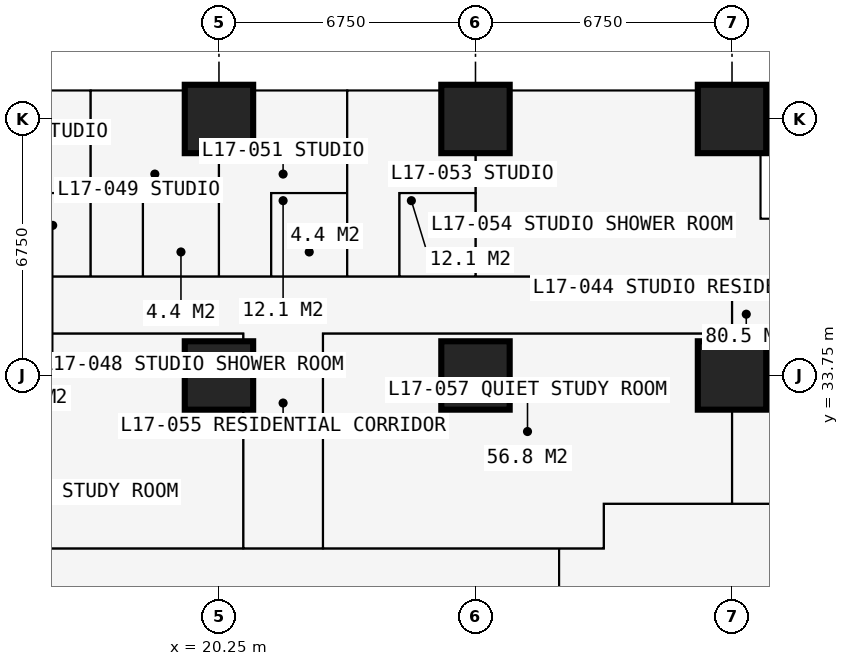
"""IFC4 building model, lengths in metres.
Left out: names, types, materials, properties, quantities, classifications, styles, units other than length and angle.
Written with IfcOpenShell. Run it as: python <this file> out.ifc"""

import sys

from ifc_helpers import new_model, si_unit, direction, frame, frame_2d, origin, origin_2d, place, context, subcontext, project, spatial, rectangle, extrude, element, fill, save


model = new_model("IFC4")
c1 = context("Model", 3, precision=1e-05, world=origin(), true_north=direction((0.0, 1.0)))
c2 = subcontext(c1, "Body", "Model", "MODEL_VIEW")
j1 = project(units=[si_unit("LENGTHUNIT", "METRE"), si_unit("PLANEANGLEUNIT", "RADIAN")], contexts=[c1])
p1 = place(None, origin())
s1 = spatial("IfcSite", under=j1, at=p1, CompositionType="ELEMENT")
p2 = place(p1, origin())
s2 = spatial("IfcBuilding", under=s1, at=p2, CompositionType="ELEMENT")
p3 = place(p2, frame((0.0, 0.0, 64.8)))
s3 = spatial("IfcBuildingStorey", under=s2, at=p3, CompositionType="ELEMENT", Elevation=64.8)
for number, where, z_axis, x_axis in (
    (1, (20.25, 33.75, 0.0), (0.0, 0.0, 1.0), (1.0, 0.0, 0.0)),
    (2, (20.25, 40.5, 0.0), (0.0, 0.0, 1.0), (1.0, 0.0, 0.0)),
    (3, (27.0, 33.75, 0.0), (0.0, 0.0, 1.0), (1.0, 0.0, 0.0)),
    (4, (27.0, 40.5, 0.0), (0.0, 0.0, 1.0), (1.0, 0.0, 0.0)),
    (5, (33.75, 33.75, 0.0), (0.0, 0.0, 1.0), (1.0, 0.0, 0.0)),
    (6, (33.75, 40.5, 0.0), (0.0, 0.0, 1.0), (1.0, 0.0, 0.0)),
):
    element("IfcColumn", number, at=place(p3, frame(where, z_axis=z_axis, x_axis=x_axis)), inside=s3, PredefinedType="COLUMN", context=c2, shape_type="SweptSolid", body=[
        extrude(rectangle(XDim=1.8, YDim=1.8, at=origin_2d()), origin(), (0.0, 0.0, 1.0), 3.6),
    ])
p4 = place(p3, frame((37.875, 37.875, 0.0), z_axis=(0.0, 0.0, 1.0), x_axis=(-1.0, 0.0, 0.0)))
e7 = element("IfcWall", 7, at=p4, inside=s3, PredefinedType="SOLIDWALL", context=c2, shape_type="SweptSolid", body=[
    extrude(rectangle(XDim=3.375, YDim=0.3, at=frame_2d((1.688, 0.0))), origin(), (0.0, 0.0, 1.0), 3.375),
])
p5 = place(p4, frame((0.788, 0.0, 0.6)))
e8 = element("IfcOpeningElement", 8, at=p5, cuts=e7, PredefinedType="OPENING", context=c2, shape_type="SweptSolid", body=[
    extrude(rectangle(XDim=1.8, YDim=2.1, at=frame_2d((0.9, 1.05))), frame((0.0, 0.16, 0.0), z_axis=(0.0, -1.0, 0.0), x_axis=(1.0, 0.0, 0.0)), (0.0, 0.0, 1.0), 0.32),
])
p6 = place(p3, frame((34.5, 37.875, 0.0), z_axis=(0.0, 0.0, 1.0), x_axis=(0.0, 1.0, 0.0)))
e9 = element("IfcWall", 9, at=p6, inside=s3, PredefinedType="SOLIDWALL", context=c2, shape_type="SweptSolid", body=[
    extrude(rectangle(XDim=3.375, YDim=0.3, at=frame_2d((1.688, 0.0))), origin(), (0.0, 0.0, 1.0), 3.375),
])
p7 = place(p6, frame((0.343, 0.0, 0.9)))
e10 = element("IfcOpeningElement", 10, at=p7, cuts=e9, PredefinedType="OPENING", context=c2, shape_type="SweptSolid", body=[
    extrude(rectangle(XDim=1.2, YDim=1.8, at=frame_2d((0.6, 0.9))), frame((0.0, 0.16, 0.0), z_axis=(0.0, -1.0, 0.0), x_axis=(1.0, 0.0, 0.0)), (0.0, 0.0, 1.0), 0.32),
])
p8 = place(p3, frame((20.25, 41.25, 0.0), z_axis=(0.0, 0.0, 1.0), x_axis=(1.0, 0.0, 0.0)))
e11 = element("IfcWall", 11, at=p8, inside=s3, PredefinedType="SOLIDWALL", context=c2, shape_type="SweptSolid", body=[
    extrude(rectangle(XDim=6.75, YDim=0.15, at=frame_2d((3.375, 0.0))), origin(), (0.0, 0.0, 1.0), 3.375),
])
p9 = place(p8, frame((0.962, 0.0, 0.0)))
e12 = element("IfcOpeningElement", 12, at=p9, cuts=e11, PredefinedType="OPENING", context=c2, shape_type="SweptSolid", body=[
    extrude(rectangle(XDim=1.0, YDim=2.2, at=frame_2d((0.5, 1.1))), frame((0.0, 0.085, 0.0), z_axis=(0.0, -1.0, 0.0), x_axis=(1.0, 0.0, 0.0)), (0.0, 0.0, 1.0), 0.17),
])
p10 = place(p8, frame((2.025, 0.0, 0.9)))
e13 = element("IfcOpeningElement", 13, at=p10, cuts=e11, PredefinedType="OPENING", context=c2, shape_type="SweptSolid", body=[
    extrude(rectangle(XDim=1.2, YDim=1.8, at=frame_2d((0.6, 0.9))), frame((0.0, 0.085, 0.0), z_axis=(0.0, -1.0, 0.0), x_axis=(1.0, 0.0, 0.0)), (0.0, 0.0, 1.0), 0.17),
])
p11 = place(p8, frame((4.788, 0.0, 0.0)))
e14 = element("IfcOpeningElement", 14, at=p11, cuts=e11, PredefinedType="OPENING", context=c2, shape_type="SweptSolid", body=[
    extrude(rectangle(XDim=1.0, YDim=2.2, at=frame_2d((0.5, 1.1))), frame((0.0, 0.085, 0.0), z_axis=(0.0, -1.0, 0.0), x_axis=(1.0, 0.0, 0.0)), (0.0, 0.0, 1.0), 0.17),
])
p12 = place(p8, frame((3.525, 0.0, 0.9)))
e15 = element("IfcOpeningElement", 15, at=p12, cuts=e11, PredefinedType="OPENING", context=c2, shape_type="SweptSolid", body=[
    extrude(rectangle(XDim=1.2, YDim=1.8, at=frame_2d((0.6, 0.9))), frame((0.0, 0.085, 0.0), z_axis=(0.0, -1.0, 0.0), x_axis=(1.0, 0.0, 0.0)), (0.0, 0.0, 1.0), 0.17),
])
p13 = place(p3, frame((23.625, 41.35, 0.0), z_axis=(0.0, 0.0, 1.0), x_axis=(0.0, 1.0, 0.0)))
e16 = element("IfcWall", 16, at=p13, inside=s3, PredefinedType="USERDEFINED", context=c2, shape_type="SweptSolid", body=[
    extrude(rectangle(XDim=2.2, YDim=1.0, at=frame_2d((1.1, 0.0))), origin(), (0.0, 0.0, 1.0), 0.9),
])
p14 = place(p3, frame((10.125, 34.85, 0.0), z_axis=(0.0, 0.0, 1.0), x_axis=(1.0, 0.0, 0.0)))
e17 = element("IfcWall", 17, at=p14, inside=s3, PredefinedType="PARTITIONING", context=c2, shape_type="SweptSolid", body=[
    extrude(rectangle(XDim=10.762, YDim=0.15, at=frame_2d((5.381, 0.0))), origin(), (0.0, 0.0, 1.0), 3.375),
])
p15 = place(p14, frame((4.9, 0.0, 0.0)))
e18 = element("IfcOpeningElement", 18, at=p15, cuts=e17, PredefinedType="OPENING", context=c2, shape_type="SweptSolid", body=[
    extrude(rectangle(XDim=0.95, YDim=2.2, at=frame_2d((0.475, 1.1))), frame((0.0, 0.085, 0.0), z_axis=(0.0, -1.0, 0.0), x_axis=(1.0, 0.0, 0.0)), (0.0, 0.0, 1.0), 0.17),
])
p16 = place(p3, frame((10.125, 36.35, 0.0), z_axis=(0.0, 0.0, 1.0), x_axis=(1.0, 0.0, 0.0)))
e19 = element("IfcWall", 19, at=p16, inside=s3, PredefinedType="PARTITIONING", context=c2, shape_type="SweptSolid", body=[
    extrude(rectangle(XDim=23.625, YDim=0.1, at=frame_2d((11.812, 0.0))), origin(), (0.0, 0.0, 1.0), 3.375),
])
p17 = place(p16, frame((0.2, 0.0, 0.0)))
e20 = element("IfcOpeningElement", 20, at=p17, cuts=e19, PredefinedType="OPENING", context=c2, shape_type="SweptSolid", body=[
    extrude(rectangle(XDim=0.95, YDim=2.2, at=frame_2d((0.475, 1.1))), frame((0.0, 0.06, 0.0), z_axis=(0.0, -1.0, 0.0), x_axis=(1.0, 0.0, 0.0)), (0.0, 0.0, 1.0), 0.12),
])
p18 = place(p16, frame((3.625, 0.0, 0.0)))
e21 = element("IfcOpeningElement", 21, at=p18, cuts=e19, PredefinedType="OPENING", context=c2, shape_type="SweptSolid", body=[
    extrude(rectangle(XDim=0.95, YDim=2.2, at=frame_2d((0.475, 1.1))), frame((0.0, 0.06, 0.0), z_axis=(0.0, -1.0, 0.0), x_axis=(1.0, 0.0, 0.0)), (0.0, 0.0, 1.0), 0.12),
])
p19 = place(p16, frame((7.0, 0.0, 0.0)))
e22 = element("IfcOpeningElement", 22, at=p19, cuts=e19, PredefinedType="OPENING", context=c2, shape_type="SweptSolid", body=[
    extrude(rectangle(XDim=0.95, YDim=2.2, at=frame_2d((0.475, 1.1))), frame((0.0, 0.06, 0.0), z_axis=(0.0, -1.0, 0.0), x_axis=(1.0, 0.0, 0.0)), (0.0, 0.0, 1.0), 0.12),
])
p20 = place(p16, frame((10.375, 0.0, 0.0)))
e23 = element("IfcOpeningElement", 23, at=p20, cuts=e19, PredefinedType="OPENING", context=c2, shape_type="SweptSolid", body=[
    extrude(rectangle(XDim=0.95, YDim=2.2, at=frame_2d((0.475, 1.1))), frame((0.0, 0.06, 0.0), z_axis=(0.0, -1.0, 0.0), x_axis=(1.0, 0.0, 0.0)), (0.0, 0.0, 1.0), 0.12),
])
p21 = place(p16, frame((13.75, 0.0, 0.0)))
e24 = element("IfcOpeningElement", 24, at=p21, cuts=e19, PredefinedType="OPENING", context=c2, shape_type="SweptSolid", body=[
    extrude(rectangle(XDim=0.95, YDim=2.2, at=frame_2d((0.475, 1.1))), frame((0.0, 0.06, 0.0), z_axis=(0.0, -1.0, 0.0), x_axis=(1.0, 0.0, 0.0)), (0.0, 0.0, 1.0), 0.12),
])
p22 = place(p3, frame((11.3, 29.2, 0.0), z_axis=(0.0, 0.0, 1.0), x_axis=(1.0, 0.0, 0.0)))
e25 = element("IfcWall", 25, at=p22, inside=s3, PredefinedType="PARTITIONING", context=c2, shape_type="SweptSolid", body=[
    extrude(rectangle(XDim=19.075, YDim=0.15, at=frame_2d((9.538, 0.0))), origin(), (0.0, 0.0, 1.0), 3.375),
])
p23 = place(p22, frame((10.137, 0.0, 0.0)))
e26 = element("IfcOpeningElement", 26, at=p23, cuts=e25, PredefinedType="OPENING", context=c2, shape_type="SweptSolid", body=[
    extrude(rectangle(XDim=1.0, YDim=2.2, at=frame_2d((0.5, 1.1))), frame((0.0, 0.085, 0.0), z_axis=(0.0, -1.0, 0.0), x_axis=(1.0, 0.0, 0.0)), (0.0, 0.0, 1.0), 0.17),
])
p24 = place(p3, frame((14.875, 38.55, 0.0), z_axis=(0.0, 0.0, 1.0), x_axis=(1.0, 0.0, 0.0)))
e27 = element("IfcWall", 27, at=p24, inside=s3, PredefinedType="PARTITIONING", context=c2, shape_type="SweptSolid", body=[
    extrude(rectangle(XDim=2.0, YDim=0.1, at=frame_2d((1.0, 0.0))), origin(), (0.0, 0.0, 1.0), 3.375),
])
p25 = place(p3, frame((16.875, 36.35, 0.0), z_axis=(0.0, 0.0, 1.0), x_axis=(0.0, 1.0, 0.0)))
e28 = element("IfcWall", 28, at=p25, inside=s3, PredefinedType="PARTITIONING", context=c2, shape_type="SweptSolid", body=[
    extrude(rectangle(XDim=4.884, YDim=0.175, at=frame_2d((2.442, 0.0))), origin(), (0.0, 0.0, 1.0), 3.375),
])
p26 = place(p3, frame((18.25, 36.35, 0.0), z_axis=(0.0, 0.0, 1.0), x_axis=(0.0, 1.0, 0.0)))
e29 = element("IfcWall", 29, at=p26, inside=s3, PredefinedType="PARTITIONING", context=c2, shape_type="SweptSolid", body=[
    extrude(rectangle(XDim=2.2, YDim=0.1, at=frame_2d((1.1, 0.0))), origin(), (0.0, 0.0, 1.0), 3.375),
])
p27 = place(p26, frame((0.65, 0.0, 0.0)))
e30 = element("IfcOpeningElement", 30, at=p27, cuts=e29, PredefinedType="OPENING", context=c2, shape_type="SweptSolid", body=[
    extrude(rectangle(XDim=0.9, YDim=2.2, at=frame_2d((0.45, 1.1))), frame((0.0, 0.06, 0.0), z_axis=(0.0, -1.0, 0.0), x_axis=(1.0, 0.0, 0.0)), (0.0, 0.0, 1.0), 0.12),
])
p28 = place(p3, frame((18.25, 38.55, 0.0), z_axis=(0.0, 0.0, 1.0), x_axis=(1.0, 0.0, 0.0)))
e31 = element("IfcWall", 31, at=p28, inside=s3, PredefinedType="PARTITIONING", context=c2, shape_type="SweptSolid", body=[
    extrude(rectangle(XDim=2.0, YDim=0.1, at=frame_2d((1.0, 0.0))), origin(), (0.0, 0.0, 1.0), 3.375),
])
p29 = place(p3, frame((20.25, 36.35, 0.0), z_axis=(0.0, 0.0, 1.0), x_axis=(0.0, 1.0, 0.0)))
e32 = element("IfcWall", 32, at=p29, inside=s3, PredefinedType="PARTITIONING", context=c2, shape_type="SweptSolid", body=[
    extrude(rectangle(XDim=4.884, YDim=0.175, at=frame_2d((2.442, 0.0))), origin(), (0.0, 0.0, 1.0), 2.61),
])
p30 = place(p3, frame((20.887, 29.2, 0.0), z_axis=(0.0, 0.0, 1.0), x_axis=(0.0, 1.0, 0.0)))
e33 = element("IfcWall", 33, at=p30, inside=s3, PredefinedType="PARTITIONING", context=c2, shape_type="SweptSolid", body=[
    extrude(rectangle(XDim=5.65, YDim=0.15, at=frame_2d((2.825, 0.0))), origin(), (0.0, 0.0, 1.0), 3.375),
])
p31 = place(p3, frame((21.625, 36.35, 0.0), z_axis=(0.0, 0.0, 1.0), x_axis=(0.0, 1.0, 0.0)))
e34 = element("IfcWall", 34, at=p31, inside=s3, PredefinedType="PARTITIONING", context=c2, shape_type="SweptSolid", body=[
    extrude(rectangle(XDim=2.2, YDim=0.1, at=frame_2d((1.1, 0.0))), origin(), (0.0, 0.0, 1.0), 3.375),
])
p32 = place(p31, frame((0.65, 0.0, 0.0)))
e35 = element("IfcOpeningElement", 35, at=p32, cuts=e34, PredefinedType="OPENING", context=c2, shape_type="SweptSolid", body=[
    extrude(rectangle(XDim=0.9, YDim=2.2, at=frame_2d((0.45, 1.1))), frame((0.0, 0.06, 0.0), z_axis=(0.0, -1.0, 0.0), x_axis=(1.0, 0.0, 0.0)), (0.0, 0.0, 1.0), 0.12),
])
p33 = place(p3, frame((21.625, 38.55, 0.0), z_axis=(0.0, 0.0, 1.0), x_axis=(1.0, 0.0, 0.0)))
e36 = element("IfcWall", 36, at=p33, inside=s3, PredefinedType="PARTITIONING", context=c2, shape_type="SweptSolid", body=[
    extrude(rectangle(XDim=2.0, YDim=0.1, at=frame_2d((1.0, 0.0))), origin(), (0.0, 0.0, 1.0), 3.375),
])
p34 = place(p3, frame((22.988, 34.85, 0.0), z_axis=(0.0, 0.0, 1.0), x_axis=(1.0, 0.0, 0.0)))
e37 = element("IfcWall", 37, at=p34, inside=s3, PredefinedType="PARTITIONING", context=c2, shape_type="SweptSolid", body=[
    extrude(rectangle(XDim=10.762, YDim=0.15, at=frame_2d((5.381, 0.0))), origin(), (0.0, 0.0, 1.0), 3.375),
])
p35 = place(p34, frame((4.95, 0.0, 0.0)))
e38 = element("IfcOpeningElement", 38, at=p35, cuts=e37, PredefinedType="OPENING", context=c2, shape_type="SweptSolid", body=[
    extrude(rectangle(XDim=0.95, YDim=2.2, at=frame_2d((0.475, 1.1))), frame((0.0, 0.085, 0.0), z_axis=(0.0, -1.0, 0.0), x_axis=(1.0, 0.0, 0.0)), (0.0, 0.0, 1.0), 0.17),
])
p36 = place(p3, frame((22.988, 29.2, 0.0), z_axis=(0.0, 0.0, 1.0), x_axis=(0.0, 1.0, 0.0)))
e39 = element("IfcWall", 39, at=p36, inside=s3, PredefinedType="PARTITIONING", context=c2, shape_type="SweptSolid", body=[
    extrude(rectangle(XDim=5.65, YDim=0.15, at=frame_2d((2.825, 0.0))), origin(), (0.0, 0.0, 1.0), 3.375),
])
p37 = place(p3, frame((23.625, 36.35, 0.0), z_axis=(0.0, 0.0, 1.0), x_axis=(0.0, 1.0, 0.0)))
e40 = element("IfcWall", 40, at=p37, inside=s3, PredefinedType="PARTITIONING", context=c2, shape_type="SweptSolid", body=[
    extrude(rectangle(XDim=4.884, YDim=0.175, at=frame_2d((2.442, 0.0))), origin(), (0.0, 0.0, 1.0), 3.375),
])
p38 = place(p3, frame((25.0, 36.35, 0.0), z_axis=(0.0, 0.0, 1.0), x_axis=(0.0, 1.0, 0.0)))
e41 = element("IfcWall", 41, at=p38, inside=s3, PredefinedType="PARTITIONING", context=c2, shape_type="SweptSolid", body=[
    extrude(rectangle(XDim=2.2, YDim=0.1, at=frame_2d((1.1, 0.0))), origin(), (0.0, 0.0, 1.0), 3.375),
])
p39 = place(p38, frame((0.65, 0.0, 0.0)))
e42 = element("IfcOpeningElement", 42, at=p39, cuts=e41, PredefinedType="OPENING", context=c2, shape_type="SweptSolid", body=[
    extrude(rectangle(XDim=0.9, YDim=2.2, at=frame_2d((0.45, 1.1))), frame((0.0, 0.06, 0.0), z_axis=(0.0, -1.0, 0.0), x_axis=(1.0, 0.0, 0.0)), (0.0, 0.0, 1.0), 0.12),
])
p40 = place(p3, frame((25.0, 38.55, 0.0), z_axis=(0.0, 0.0, 1.0), x_axis=(1.0, 0.0, 0.0)))
e43 = element("IfcWall", 43, at=p40, inside=s3, PredefinedType="PARTITIONING", context=c2, shape_type="SweptSolid", body=[
    extrude(rectangle(XDim=2.0, YDim=0.1, at=frame_2d((1.0, 0.0))), origin(), (0.0, 0.0, 1.0), 3.375),
])
p41 = place(p3, frame((27.0, 36.35, 0.0), z_axis=(0.0, 0.0, 1.0), x_axis=(0.0, 1.0, 0.0)))
e44 = element("IfcWall", 44, at=p41, inside=s3, PredefinedType="PARTITIONING", context=c2, shape_type="SweptSolid", body=[
    extrude(rectangle(XDim=4.884, YDim=0.15, at=frame_2d((2.442, 0.0))), origin(), (0.0, 0.0, 1.0), 2.806),
])
p42 = place(p3, frame((29.2, 11.3, 0.0), z_axis=(0.0, 0.0, 1.0), x_axis=(0.0, 1.0, 0.0)))
e45 = element("IfcWall", 45, at=p42, inside=s3, PredefinedType="PARTITIONING", context=c2, shape_type="SweptSolid", body=[
    extrude(rectangle(XDim=17.9, YDim=0.2, at=frame_2d((8.95, 0.0))), origin(), (0.0, 0.0, 1.0), 3.375),
])
p43 = place(p42, frame((8.35, 0.0, 0.0)))
e46 = element("IfcOpeningElement", 46, at=p43, cuts=e45, PredefinedType="OPENING", context=c2, shape_type="SweptSolid", body=[
    extrude(rectangle(XDim=1.2, YDim=2.2, at=frame_2d((0.6, 1.1))), frame((0.0, 0.11, 0.0), z_axis=(0.0, -1.0, 0.0), x_axis=(1.0, 0.0, 0.0)), (0.0, 0.0, 1.0), 0.22),
])
p44 = place(p3, frame((30.375, 29.2, 0.0), z_axis=(0.0, 0.0, 1.0), x_axis=(0.0, 1.0, 0.0)))
e47 = element("IfcWall", 47, at=p44, inside=s3, PredefinedType="PARTITIONING", context=c2, shape_type="SweptSolid", body=[
    extrude(rectangle(XDim=1.175, YDim=0.15, at=frame_2d((0.587, 0.0))), origin(), (0.0, 0.0, 1.0), 3.375),
])
p45 = place(p3, frame((30.375, 30.375, 0.0), z_axis=(0.0, 0.0, 1.0), x_axis=(1.0, 0.0, 0.0)))
e48 = element("IfcWall", 48, at=p45, inside=s3, PredefinedType="PARTITIONING", context=c2, shape_type="SweptSolid", body=[
    extrude(rectangle(XDim=10.859, YDim=0.15, at=frame_2d((5.429, 0.0))), origin(), (0.0, 0.0, 1.0), 3.375),
])
p46 = place(p45, frame((4.725, 0.0, 0.0)))
e49 = element("IfcOpeningElement", 49, at=p46, cuts=e48, PredefinedType="OPENING", context=c2, shape_type="SweptSolid", body=[
    extrude(rectangle(XDim=1.0, YDim=2.2, at=frame_2d((0.5, 1.1))), frame((0.0, 0.085, 0.0), z_axis=(0.0, -1.0, 0.0), x_axis=(1.0, 0.0, 0.0)), (0.0, 0.0, 1.0), 0.17),
])
p47 = place(p3, frame((33.75, 30.375, 0.0), z_axis=(0.0, 0.0, 1.0), x_axis=(0.0, 1.0, 0.0)))
e50 = element("IfcWall", 50, at=p47, inside=s3, PredefinedType="PARTITIONING", context=c2, shape_type="SweptSolid", body=[
    extrude(rectangle(XDim=5.975, YDim=0.15, at=frame_2d((2.988, 0.0))), origin(), (0.0, 0.0, 1.0), 2.877),
])
p48 = place(p7, origin())
e51 = element("IfcWindow", 51, at=p48, inside=s3, PartitioningType="SINGLE_PANEL", PredefinedType="WINDOW", context=c2, shape_type="SweptSolid", body=[
    extrude(rectangle(XDim=1.2, YDim=1.8, at=frame_2d((0.6, 0.9))), frame((0.0, 0.03, 0.0), z_axis=(0.0, -1.0, 0.0), x_axis=(1.0, 0.0, 0.0)), (0.0, 0.0, 1.0), 0.06),
])
fill(e10, e51)
p49 = place(p9, origin())
e52 = element("IfcDoor", 52, at=p49, inside=s3, OperationType="SINGLE_SWING_LEFT", PredefinedType="DOOR", context=c2, shape_type="SweptSolid", body=[
    extrude(rectangle(XDim=1.0, YDim=2.2, at=frame_2d((0.5, 1.1))), frame((0.0, 0.025, 0.0), z_axis=(0.0, -1.0, 0.0), x_axis=(1.0, 0.0, 0.0)), (0.0, 0.0, 1.0), 0.05),
])
fill(e12, e52)
p50 = place(p10, origin())
e53 = element("IfcWindow", 53, at=p50, inside=s3, PartitioningType="SINGLE_PANEL", PredefinedType="WINDOW", context=c2, shape_type="SweptSolid", body=[
    extrude(rectangle(XDim=1.2, YDim=1.8, at=frame_2d((0.6, 0.9))), frame((0.0, 0.03, 0.0), z_axis=(0.0, -1.0, 0.0), x_axis=(1.0, 0.0, 0.0)), (0.0, 0.0, 1.0), 0.06),
])
fill(e13, e53)
p51 = place(p11, origin())
e54 = element("IfcDoor", 54, at=p51, inside=s3, OperationType="SINGLE_SWING_RIGHT", PredefinedType="DOOR", context=c2, shape_type="SweptSolid", body=[
    extrude(rectangle(XDim=1.0, YDim=2.2, at=frame_2d((0.5, 1.1))), frame((0.0, 0.025, 0.0), z_axis=(0.0, -1.0, 0.0), x_axis=(1.0, 0.0, 0.0)), (0.0, 0.0, 1.0), 0.05),
])
fill(e14, e54)
p52 = place(p12, origin())
e55 = element("IfcWindow", 55, at=p52, inside=s3, PartitioningType="SINGLE_PANEL", PredefinedType="WINDOW", context=c2, shape_type="SweptSolid", body=[
    extrude(rectangle(XDim=1.2, YDim=1.8, at=frame_2d((0.6, 0.9))), frame((0.0, 0.03, 0.0), z_axis=(0.0, -1.0, 0.0), x_axis=(1.0, 0.0, 0.0)), (0.0, 0.0, 1.0), 0.06),
])
fill(e15, e55)
p53 = place(p19, origin())
e56 = element("IfcDoor", 56, at=p53, inside=s3, OperationType="SINGLE_SWING_LEFT", PredefinedType="DOOR", context=c2, shape_type="SweptSolid", body=[
    extrude(rectangle(XDim=0.95, YDim=2.2, at=frame_2d((0.475, 1.1))), frame((0.0, 0.025, 0.0), z_axis=(0.0, -1.0, 0.0), x_axis=(1.0, 0.0, 0.0)), (0.0, 0.0, 1.0), 0.05),
])
fill(e22, e56)
p54 = place(p27, origin())
e57 = element("IfcDoor", 57, at=p54, inside=s3, OperationType="SINGLE_SWING_RIGHT", PredefinedType="DOOR", context=c2, shape_type="SweptSolid", body=[
    extrude(rectangle(XDim=0.9, YDim=2.2, at=frame_2d((0.45, 1.1))), frame((0.0, 0.025, 0.0), z_axis=(0.0, -1.0, 0.0), x_axis=(1.0, 0.0, 0.0)), (0.0, 0.0, 1.0), 0.05),
])
fill(e30, e57)
p55 = place(p20, origin())
e58 = element("IfcDoor", 58, at=p55, inside=s3, OperationType="SINGLE_SWING_LEFT", PredefinedType="DOOR", context=c2, shape_type="SweptSolid", body=[
    extrude(rectangle(XDim=0.95, YDim=2.2, at=frame_2d((0.475, 1.1))), frame((0.0, 0.025, 0.0), z_axis=(0.0, -1.0, 0.0), x_axis=(1.0, 0.0, 0.0)), (0.0, 0.0, 1.0), 0.05),
])
fill(e23, e58)
p56 = place(p32, origin())
e59 = element("IfcDoor", 59, at=p56, inside=s3, OperationType="SINGLE_SWING_RIGHT", PredefinedType="DOOR", context=c2, shape_type="SweptSolid", body=[
    extrude(rectangle(XDim=0.9, YDim=2.2, at=frame_2d((0.45, 1.1))), frame((0.0, 0.025, 0.0), z_axis=(0.0, -1.0, 0.0), x_axis=(1.0, 0.0, 0.0)), (0.0, 0.0, 1.0), 0.05),
])
fill(e35, e59)
p57 = place(p21, origin())
e60 = element("IfcDoor", 60, at=p57, inside=s3, OperationType="SINGLE_SWING_LEFT", PredefinedType="DOOR", context=c2, shape_type="SweptSolid", body=[
    extrude(rectangle(XDim=0.95, YDim=2.2, at=frame_2d((0.475, 1.1))), frame((0.0, 0.025, 0.0), z_axis=(0.0, -1.0, 0.0), x_axis=(1.0, 0.0, 0.0)), (0.0, 0.0, 1.0), 0.05),
])
fill(e24, e60)
p58 = place(p39, origin())
e61 = element("IfcDoor", 61, at=p58, inside=s3, OperationType="SINGLE_SWING_RIGHT", PredefinedType="DOOR", context=c2, shape_type="SweptSolid", body=[
    extrude(rectangle(XDim=0.9, YDim=2.2, at=frame_2d((0.45, 1.1))), frame((0.0, 0.025, 0.0), z_axis=(0.0, -1.0, 0.0), x_axis=(1.0, 0.0, 0.0)), (0.0, 0.0, 1.0), 0.05),
])
fill(e42, e61)
p59 = place(p23, origin())
e62 = element("IfcDoor", 62, at=p59, inside=s3, OperationType="SINGLE_SWING_LEFT", PredefinedType="DOOR", context=c2, shape_type="SweptSolid", body=[
    extrude(rectangle(XDim=1.0, YDim=2.2, at=frame_2d((0.5, 1.1))), frame((0.0, 0.025, 0.0), z_axis=(0.0, -1.0, 0.0), x_axis=(1.0, 0.0, 0.0)), (0.0, 0.0, 1.0), 0.05),
])
fill(e26, e62)
p60 = place(p15, origin())
e63 = element("IfcDoor", 63, at=p60, inside=s3, OperationType="SINGLE_SWING_LEFT", PredefinedType="DOOR", context=c2, shape_type="SweptSolid", body=[
    extrude(rectangle(XDim=0.95, YDim=2.2, at=frame_2d((0.475, 1.1))), frame((0.0, 0.025, 0.0), z_axis=(0.0, -1.0, 0.0), x_axis=(1.0, 0.0, 0.0)), (0.0, 0.0, 1.0), 0.05),
])
fill(e18, e63)
p61 = place(p35, origin())
e64 = element("IfcDoor", 64, at=p61, inside=s3, OperationType="SINGLE_SWING_LEFT", PredefinedType="DOOR", context=c2, shape_type="SweptSolid", body=[
    extrude(rectangle(XDim=0.95, YDim=2.2, at=frame_2d((0.475, 1.1))), frame((0.0, 0.025, 0.0), z_axis=(0.0, -1.0, 0.0), x_axis=(1.0, 0.0, 0.0)), (0.0, 0.0, 1.0), 0.05),
])
fill(e38, e64)
save(model, sys.argv[1])
